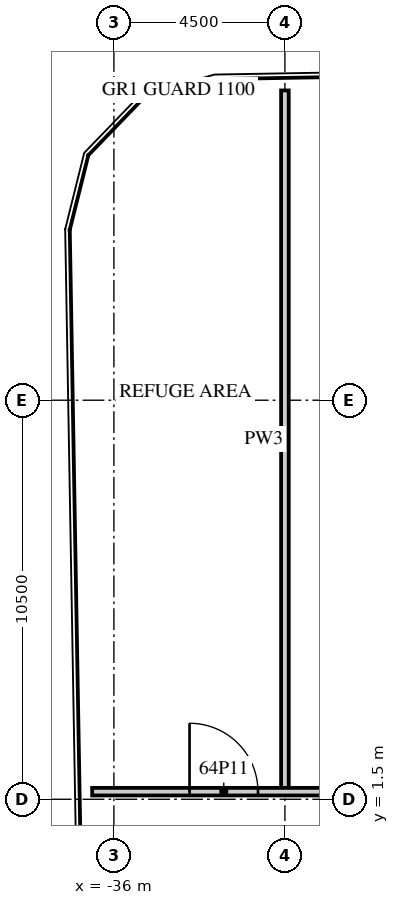
"""IFC4 building model, lengths in metres.
Left out: names, types, materials, properties, quantities, classifications, styles, units other than length and angle.
Written with IfcOpenShell. Run it as: python <this file> out.ifc"""

import sys

from ifc_helpers import new_model, si_unit, direction, frame, frame_2d, origin, place, context, subcontext, project, spatial, rectangle, extrude, element, fill, save


model = new_model("IFC4")
c1 = context("Model", 3, precision=1e-05, world=origin(), true_north=direction((0.0, 1.0)))
c2 = subcontext(c1, "Body", "Model", "MODEL_VIEW")
j1 = project(units=[si_unit("LENGTHUNIT", "METRE"), si_unit("PLANEANGLEUNIT", "RADIAN")], contexts=[c1])
p1 = place(None, origin())
s1 = spatial("IfcSite", under=j1, at=p1, CompositionType="ELEMENT")
p2 = place(p1, origin())
s2 = spatial("IfcBuilding", under=s1, at=p2, CompositionType="ELEMENT")
p3 = place(p2, frame((0.0, 0.0, 257.3)))
s3 = spatial("IfcBuildingStorey", under=s2, at=p3, CompositionType="ELEMENT", Elevation=257.3)
p4 = place(p3, frame((-31.5, 1.8, 0.0), z_axis=(0.0, 0.0, 1.0), x_axis=(0.0, 1.0, 0.0)))
e1 = element("IfcWall", 1, at=p4, inside=s3, PredefinedType="PARTITIONING", context=c2, shape_type="SweptSolid", body=[
    extrude(rectangle(XDim=18.351, YDim=0.2, at=frame_2d((9.175, 0.0))), origin(), (0.0, 0.0, 1.0), 4.2),
])
p5 = place(p3, frame((-36.572, 1.7, 0.0), z_axis=(0.0, 0.0, 1.0), x_axis=(1.0, 0.0, 0.0)))
e2 = element("IfcWall", 2, at=p5, inside=s3, PredefinedType="PARTITIONING", context=c2, shape_type="SweptSolid", body=[
    extrude(rectangle(XDim=49.872, YDim=0.2, at=frame_2d((24.936, 0.0))), origin(), (0.0, 0.0, 1.0), 4.2),
])
p6 = place(p5, frame((43.422, 0.0, 0.0)))
e3 = element("IfcOpeningElement", 3, at=p6, cuts=e2, PredefinedType="OPENING", context=c2, shape_type="SweptSolid", body=[
    extrude(rectangle(XDim=1.8, YDim=2.1, at=frame_2d((0.9, 1.05))), frame((0.0, 0.11, 0.0), z_axis=(0.0, -1.0, 0.0), x_axis=(1.0, 0.0, 0.0)), (0.0, 0.0, 1.0), 0.22),
])
p7 = place(p5, frame((39.497, 0.0, 0.0)))
e4 = element("IfcOpeningElement", 4, at=p7, cuts=e2, PredefinedType="OPENING", context=c2, shape_type="SweptSolid", body=[
    extrude(rectangle(XDim=1.2, YDim=2.1, at=frame_2d((0.6, 1.05))), frame((0.0, 0.11, 0.0), z_axis=(0.0, -1.0, 0.0), x_axis=(1.0, 0.0, 0.0)), (0.0, 0.0, 1.0), 0.22),
])
p8 = place(p5, frame((25.432, 0.0, 0.0)))
e5 = element("IfcOpeningElement", 5, at=p8, cuts=e2, PredefinedType="OPENING", context=c2, shape_type="SweptSolid", body=[
    extrude(rectangle(XDim=1.8, YDim=2.1, at=frame_2d((0.9, 1.05))), frame((0.0, 0.11, 0.0), z_axis=(0.0, -1.0, 0.0), x_axis=(1.0, 0.0, 0.0)), (0.0, 0.0, 1.0), 0.22),
])
p9 = place(p5, frame((18.912, 0.0, 0.0)))
e6 = element("IfcOpeningElement", 6, at=p9, cuts=e2, PredefinedType="OPENING", context=c2, shape_type="SweptSolid", body=[
    extrude(rectangle(XDim=1.8, YDim=2.1, at=frame_2d((0.9, 1.05))), frame((0.0, 0.11, 0.0), z_axis=(0.0, -1.0, 0.0), x_axis=(1.0, 0.0, 0.0)), (0.0, 0.0, 1.0), 0.22),
])
p10 = place(p5, frame((9.872, 0.0, 0.0)))
e7 = element("IfcOpeningElement", 7, at=p10, cuts=e2, PredefinedType="OPENING", context=c2, shape_type="SweptSolid", body=[
    extrude(rectangle(XDim=1.0, YDim=2.1, at=frame_2d((0.5, 1.05))), frame((0.0, 0.11, 0.0), z_axis=(0.0, -1.0, 0.0), x_axis=(1.0, 0.0, 0.0)), (0.0, 0.0, 1.0), 0.22),
])
p11 = place(p5, frame((2.563, 0.0, 0.0)))
e8 = element("IfcOpeningElement", 8, at=p11, cuts=e2, PredefinedType="OPENING", context=c2, shape_type="SweptSolid", body=[
    extrude(rectangle(XDim=1.8, YDim=2.1, at=frame_2d((0.9, 1.05))), frame((0.0, 0.11, 0.0), z_axis=(0.0, -1.0, 0.0), x_axis=(1.0, 0.0, 0.0)), (0.0, 0.0, 1.0), 0.22),
])
p12 = place(p11, origin())
e9 = element("IfcDoor", 9, at=p12, inside=s3, OperationType="DOUBLE_DOOR_DOUBLE_SWING", PredefinedType="DOOR", context=c2, shape_type="SweptSolid", body=[
    extrude(rectangle(XDim=1.8, YDim=2.1, at=frame_2d((0.9, 1.05))), frame((0.0, 0.025, 0.0), z_axis=(0.0, -1.0, 0.0), x_axis=(1.0, 0.0, 0.0)), (0.0, 0.0, 1.0), 0.05),
])
fill(e8, e9)
save(model, sys.argv[1])
